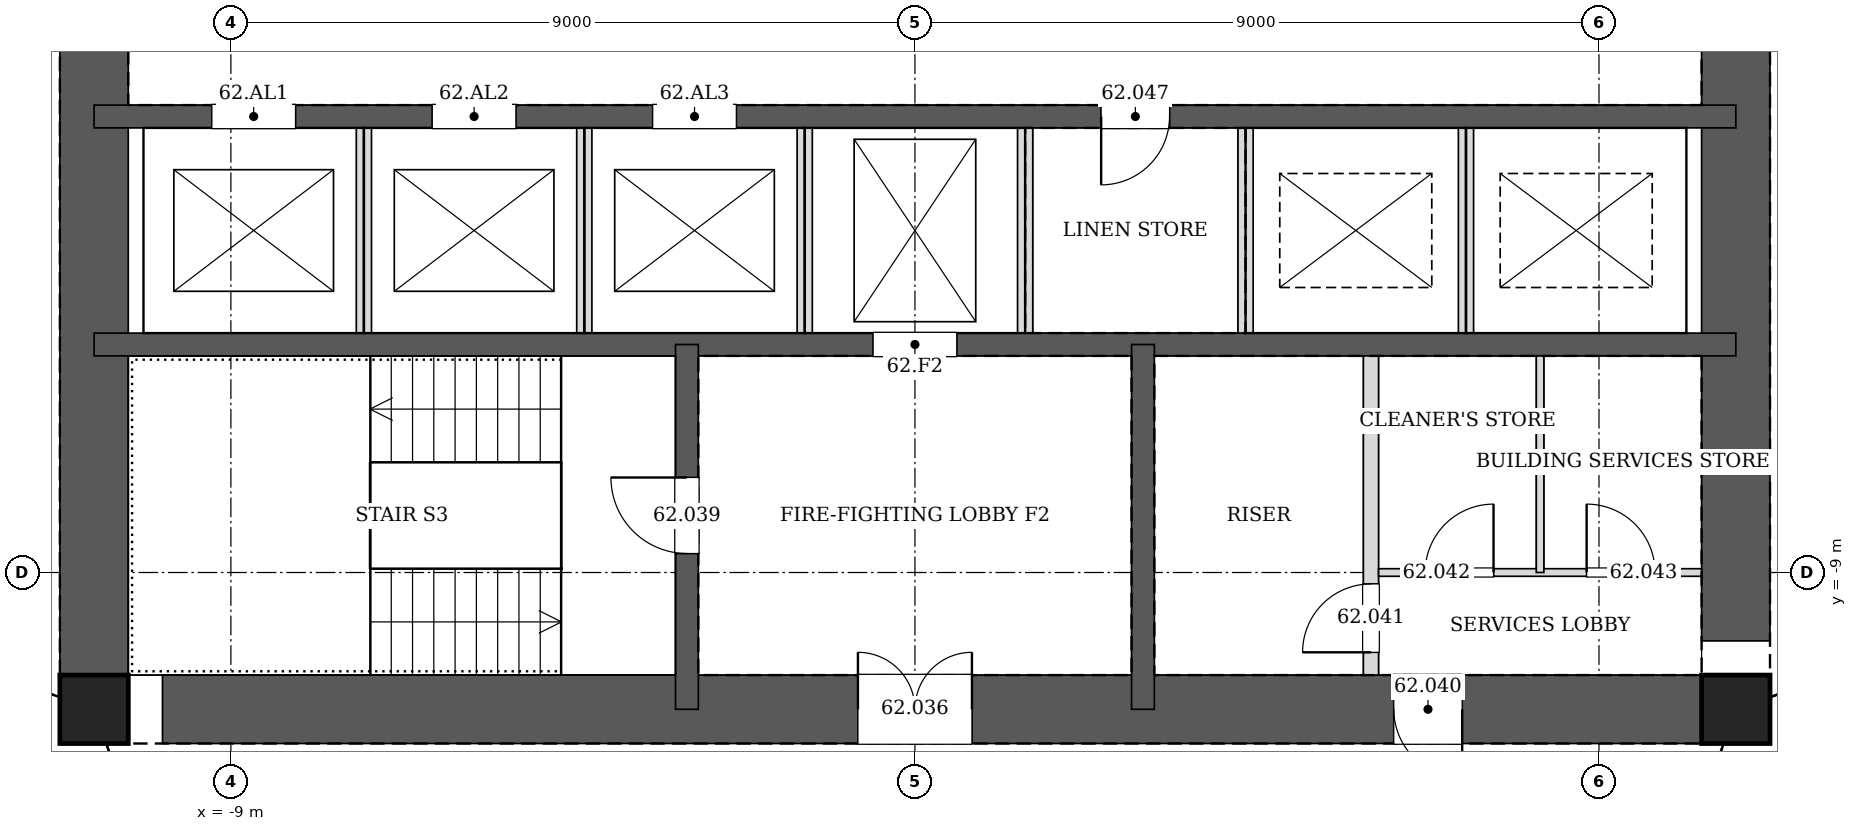
"""IFC4 building model, lengths in metres.
Left out: names, types, materials, properties, quantities, classifications, styles, units other than length and angle.
Written with IfcOpenShell. Run it as: python <this file> out.ifc"""

import sys

from ifc_helpers import new_model, si_unit, direction, frame, frame_2d, origin, origin_2d, place, context, subcontext, project, spatial, rectangle, hollow_rectangle, extrude, element, fill, save


model = new_model("IFC4")
c1 = context("Model", 3, precision=1e-05, world=origin(), true_north=direction((0.0, 1.0)))
c2 = subcontext(c1, "Body", "Model", "MODEL_VIEW")
j1 = project(units=[si_unit("LENGTHUNIT", "METRE"), si_unit("PLANEANGLEUNIT", "RADIAN")], contexts=[c1])
p1 = place(None, origin())
s1 = spatial("IfcSite", under=j1, at=p1, CompositionType="ELEMENT")
p2 = place(p1, origin())
s2 = spatial("IfcBuilding", under=s1, at=p2, CompositionType="ELEMENT")
p3 = place(p2, frame((0.0, 0.0, 258.4)))
s3 = spatial("IfcBuildingStorey", under=s2, at=p3, CompositionType="ELEMENT", Elevation=258.4)
for number, where, z_axis, x_axis in (
    (1, (-10.8, -10.8, 0.0), (0.0, 0.0, 1.0), (1.0, 0.0, 0.0)),
    (2, (10.8, -10.8, 0.0), (0.0, 0.0, 1.0), (1.0, 0.0, 0.0)),
):
    element("IfcColumn", number, at=place(p3, frame(where, z_axis=z_axis, x_axis=x_axis)), inside=s3, PredefinedType="COLUMN", context=c2, shape_type="SweptSolid", body=[
        extrude(hollow_rectangle(XDim=0.9, YDim=0.9, WallThickness=0.04, at=origin_2d()), origin(), (0.0, 0.0, 1.0), 3.4),
    ])
p4 = place(p3, frame((-10.8, -10.8, 0.0), z_axis=(0.0, 0.0, 1.0), x_axis=(1.0, 0.0, 0.0)))
e3 = element("IfcWall", 3, at=p4, inside=s3, PredefinedType="SOLIDWALL", context=c2, shape_type="SweptSolid", body=[
    extrude(rectangle(XDim=21.6, YDim=0.9, at=frame_2d((10.8, 0.0))), origin(), (0.0, 0.0, 1.0), 3.4),
])
p5 = place(p4, frame((10.05, 0.0, 0.0)))
e4 = element("IfcOpeningElement", 4, at=p5, cuts=e3, PredefinedType="OPENING", context=c2, shape_type="SweptSolid", body=[
    extrude(rectangle(XDim=1.5, YDim=2.1, at=frame_2d((0.75, 1.05))), frame((0.0, 0.46, 0.0), z_axis=(0.0, -1.0, 0.0), x_axis=(1.0, 0.0, 0.0)), (0.0, 0.0, 1.0), 0.92),
])
p6 = place(p4, frame((17.1, 0.0, 0.0)))
e5 = element("IfcOpeningElement", 5, at=p6, cuts=e3, PredefinedType="OPENING", context=c2, shape_type="SweptSolid", body=[
    extrude(rectangle(XDim=0.9, YDim=2.1, at=frame_2d((0.45, 1.05))), frame((0.0, 0.46, 0.0), z_axis=(0.0, -1.0, 0.0), x_axis=(1.0, 0.0, 0.0)), (0.0, 0.0, 1.0), 0.92),
])
p7 = place(p3, frame((10.8, -10.8, 0.0), z_axis=(0.0, 0.0, 1.0), x_axis=(0.0, 1.0, 0.0)))
e6 = element("IfcWall", 6, at=p7, inside=s3, PredefinedType="SOLIDWALL", context=c2, shape_type="SweptSolid", body=[
    extrude(rectangle(XDim=21.6, YDim=0.9, at=frame_2d((10.8, 0.0))), origin(), (0.0, 0.0, 1.0), 3.4),
])
p8 = place(p7, frame((11.7, 0.0, 0.0)))
e7 = element("IfcOpeningElement", 7, at=p8, cuts=e6, PredefinedType="OPENING", context=c2, shape_type="SweptSolid", body=[
    extrude(rectangle(XDim=1.2, YDim=2.1, at=frame_2d((0.6, 1.05))), frame((0.0, 0.46, 0.0), z_axis=(0.0, -1.0, 0.0), x_axis=(1.0, 0.0, 0.0)), (0.0, 0.0, 1.0), 0.92),
])
p9 = place(p7, frame((8.7, 0.0, 0.0)))
e8 = element("IfcOpeningElement", 8, at=p9, cuts=e6, PredefinedType="OPENING", context=c2, shape_type="SweptSolid", body=[
    extrude(rectangle(XDim=1.2, YDim=2.1, at=frame_2d((0.6, 1.05))), frame((0.0, 0.46, 0.0), z_axis=(0.0, -1.0, 0.0), x_axis=(1.0, 0.0, 0.0)), (0.0, 0.0, 1.0), 0.92),
])
p10 = place(p3, frame((-10.8, 10.8, 0.0), z_axis=(0.0, 0.0, 1.0), x_axis=(0.0, -1.0, 0.0)))
e9 = element("IfcWall", 9, at=p10, inside=s3, PredefinedType="SOLIDWALL", context=c2, shape_type="SweptSolid", body=[
    extrude(rectangle(XDim=21.6, YDim=0.9, at=frame_2d((10.8, 0.0))), origin(), (0.0, 0.0, 1.0), 3.4),
])
p11 = place(p10, frame((8.7, 0.0, 0.0)))
e10 = element("IfcOpeningElement", 10, at=p11, cuts=e9, PredefinedType="OPENING", context=c2, shape_type="SweptSolid", body=[
    extrude(rectangle(XDim=1.2, YDim=2.1, at=frame_2d((0.6, 1.05))), frame((0.0, 0.46, 0.0), z_axis=(0.0, -1.0, 0.0), x_axis=(1.0, 0.0, 0.0)), (0.0, 0.0, 1.0), 0.92),
])
p12 = place(p10, frame((11.7, 0.0, 0.0)))
e11 = element("IfcOpeningElement", 11, at=p12, cuts=e9, PredefinedType="OPENING", context=c2, shape_type="SweptSolid", body=[
    extrude(rectangle(XDim=1.2, YDim=2.1, at=frame_2d((0.6, 1.05))), frame((0.0, 0.46, 0.0), z_axis=(0.0, -1.0, 0.0), x_axis=(1.0, 0.0, 0.0)), (0.0, 0.0, 1.0), 0.92),
])
p13 = place(p3, frame((-10.8, -3.0, 0.0), z_axis=(0.0, 0.0, 1.0), x_axis=(1.0, 0.0, 0.0)))
e12 = element("IfcWall", 12, at=p13, inside=s3, PredefinedType="SOLIDWALL", context=c2, shape_type="SweptSolid", body=[
    extrude(rectangle(XDim=21.6, YDim=0.3, at=frame_2d((10.8, 0.0))), origin(), (0.0, 0.0, 1.0), 3.4),
])
p14 = place(p13, frame((13.25, 0.0, 0.0)))
e13 = element("IfcOpeningElement", 13, at=p14, cuts=e12, PredefinedType="OPENING", context=c2, shape_type="SweptSolid", body=[
    extrude(rectangle(XDim=0.9, YDim=2.1, at=frame_2d((0.45, 1.05))), frame((0.0, 0.16, 0.0), z_axis=(0.0, -1.0, 0.0), x_axis=(1.0, 0.0, 0.0)), (0.0, 0.0, 1.0), 0.32),
])
p15 = place(p13, frame((1.55, 0.0, 0.0)))
e14 = element("IfcOpeningElement", 14, at=p15, cuts=e12, PredefinedType="OPENING", context=c2, shape_type="SweptSolid", body=[
    extrude(rectangle(XDim=1.1, YDim=2.1, at=frame_2d((0.55, 1.05))), frame((0.0, 0.16, 0.0), z_axis=(0.0, -1.0, 0.0), x_axis=(1.0, 0.0, 0.0)), (0.0, 0.0, 1.0), 0.32),
])
p16 = place(p13, frame((4.45, 0.0, 0.0)))
e15 = element("IfcOpeningElement", 15, at=p16, cuts=e12, PredefinedType="OPENING", context=c2, shape_type="SweptSolid", body=[
    extrude(rectangle(XDim=1.1, YDim=2.1, at=frame_2d((0.55, 1.05))), frame((0.0, 0.16, 0.0), z_axis=(0.0, -1.0, 0.0), x_axis=(1.0, 0.0, 0.0)), (0.0, 0.0, 1.0), 0.32),
])
p17 = place(p13, frame((7.35, 0.0, 0.0)))
e16 = element("IfcOpeningElement", 16, at=p17, cuts=e12, PredefinedType="OPENING", context=c2, shape_type="SweptSolid", body=[
    extrude(rectangle(XDim=1.1, YDim=2.1, at=frame_2d((0.55, 1.05))), frame((0.0, 0.16, 0.0), z_axis=(0.0, -1.0, 0.0), x_axis=(1.0, 0.0, 0.0)), (0.0, 0.0, 1.0), 0.32),
])
p18 = place(p3, frame((-10.8, -6.0, 0.0), z_axis=(0.0, 0.0, 1.0), x_axis=(1.0, 0.0, 0.0)))
e17 = element("IfcWall", 17, at=p18, inside=s3, PredefinedType="SOLIDWALL", context=c2, shape_type="SweptSolid", body=[
    extrude(rectangle(XDim=21.6, YDim=0.3, at=frame_2d((10.8, 0.0))), origin(), (0.0, 0.0, 1.0), 3.4),
])
p19 = place(p18, frame((10.25, 0.0, 0.0)))
e18 = element("IfcOpeningElement", 18, at=p19, cuts=e17, PredefinedType="OPENING", context=c2, shape_type="SweptSolid", body=[
    extrude(rectangle(XDim=1.1, YDim=2.1, at=frame_2d((0.55, 1.05))), frame((0.0, 0.16, 0.0), z_axis=(0.0, -1.0, 0.0), x_axis=(1.0, 0.0, 0.0)), (0.0, 0.0, 1.0), 0.32),
])
p20 = place(p3, frame((-3.0, -6.0, 0.0), z_axis=(0.0, 0.0, 1.0), x_axis=(0.0, -1.0, 0.0)))
e19 = element("IfcWall", 19, at=p20, inside=s3, PredefinedType="SOLIDWALL", context=c2, shape_type="SweptSolid", body=[
    extrude(rectangle(XDim=4.8, YDim=0.3, at=frame_2d((2.4, 0.0))), origin(), (0.0, 0.0, 1.0), 3.4),
])
p21 = place(p20, frame((1.75, 0.0, 0.0)))
e20 = element("IfcOpeningElement", 20, at=p21, cuts=e19, PredefinedType="OPENING", context=c2, shape_type="SweptSolid", body=[
    extrude(rectangle(XDim=1.0, YDim=2.1, at=frame_2d((0.5, 1.05))), frame((0.0, 0.16, 0.0), z_axis=(0.0, -1.0, 0.0), x_axis=(1.0, 0.0, 0.0)), (0.0, 0.0, 1.0), 0.32),
])
p22 = place(p3, frame((3.0, -6.0, 0.0), z_axis=(0.0, 0.0, 1.0), x_axis=(0.0, -1.0, 0.0)))
e21 = element("IfcWall", 21, at=p22, inside=s3, PredefinedType="SOLIDWALL", context=c2, shape_type="SweptSolid", body=[
    extrude(rectangle(XDim=4.8, YDim=0.3, at=frame_2d((2.4, 0.0))), origin(), (0.0, 0.0, 1.0), 3.4),
])
for number, where, z_axis, x_axis in (
    (22, (-7.25, -5.85, 0.0), (0.0, 0.0, 1.0), (0.0, 1.0, 0.0)),
    (23, (-4.35, -5.85, 0.0), (0.0, 0.0, 1.0), (0.0, 1.0, 0.0)),
    (24, (-1.45, -5.85, 0.0), (0.0, 0.0, 1.0), (0.0, 1.0, 0.0)),
):
    element("IfcWall", number, at=place(p3, frame(where, z_axis=z_axis, x_axis=x_axis)), inside=s3, PredefinedType="PARTITIONING", context=c2, shape_type="SweptSolid", body=[
        extrude(rectangle(XDim=2.7, YDim=0.2, at=frame_2d((1.35, 0.0))), origin(), (0.0, 0.0, 1.0), 3.4),
    ])
for number, where, z_axis, x_axis in (
    (25, (1.45, -5.85, 0.0), (0.0, 0.0, 1.0), (0.0, 1.0, 0.0)),
    (26, (4.35, -5.85, 0.0), (0.0, 0.0, 1.0), (0.0, 1.0, 0.0)),
):
    element("IfcWall", number, at=place(p3, frame(where, z_axis=z_axis, x_axis=x_axis)), inside=s3, PredefinedType="PARTITIONING", context=c2, shape_type="SweptSolid", body=[
        extrude(rectangle(XDim=2.7, YDim=0.2, at=frame_2d((1.35, 0.0))), origin(), (0.0, 0.0, 1.0), 3.15),
    ])
p23 = place(p3, frame((7.25, -5.85, 0.0), z_axis=(0.0, 0.0, 1.0), x_axis=(0.0, 1.0, 0.0)))
e27 = element("IfcWall", 27, at=p23, inside=s3, PredefinedType="PARTITIONING", context=c2, shape_type="SweptSolid", body=[
    extrude(rectangle(XDim=2.7, YDim=0.2, at=frame_2d((1.35, 0.0))), origin(), (0.0, 0.0, 1.0), 3.4),
])
p24 = place(p3, frame((6.0, -10.35, 0.0), z_axis=(0.0, 0.0, 1.0), x_axis=(0.0, 1.0, 0.0)))
e28 = element("IfcWall", 28, at=p24, inside=s3, PredefinedType="PARTITIONING", context=c2, shape_type="SweptSolid", body=[
    extrude(rectangle(XDim=4.2, YDim=0.2, at=frame_2d((2.1, 0.0))), origin(), (0.0, 0.0, 1.0), 3.15),
])
p25 = place(p24, frame((0.3, 0.0, 0.0)))
e29 = element("IfcOpeningElement", 29, at=p25, cuts=e28, PredefinedType="OPENING", context=c2, shape_type="SweptSolid", body=[
    extrude(rectangle(XDim=0.9, YDim=2.1, at=frame_2d((0.45, 1.05))), frame((0.0, 0.11, 0.0), z_axis=(0.0, -1.0, 0.0), x_axis=(1.0, 0.0, 0.0)), (0.0, 0.0, 1.0), 0.22),
])
p26 = place(p3, frame((6.1, -9.0, 0.0), z_axis=(0.0, 0.0, 1.0), x_axis=(1.0, 0.0, 0.0)))
e30 = element("IfcWall", 30, at=p26, inside=s3, PredefinedType="PARTITIONING", context=c2, shape_type="SweptSolid", body=[
    extrude(rectangle(XDim=4.25, YDim=0.1, at=frame_2d((2.125, 0.0))), origin(), (0.0, 0.0, 1.0), 3.15),
])
p27 = place(p26, frame((0.613, 0.0, 0.0)))
e31 = element("IfcOpeningElement", 31, at=p27, cuts=e30, PredefinedType="OPENING", context=c2, shape_type="SweptSolid", body=[
    extrude(rectangle(XDim=0.9, YDim=2.1, at=frame_2d((0.45, 1.05))), frame((0.0, 0.06, 0.0), z_axis=(0.0, -1.0, 0.0), x_axis=(1.0, 0.0, 0.0)), (0.0, 0.0, 1.0), 0.12),
])
p28 = place(p26, frame((2.738, 0.0, 0.0)))
e32 = element("IfcOpeningElement", 32, at=p28, cuts=e30, PredefinedType="OPENING", context=c2, shape_type="SweptSolid", body=[
    extrude(rectangle(XDim=0.9, YDim=2.1, at=frame_2d((0.45, 1.05))), frame((0.0, 0.06, 0.0), z_axis=(0.0, -1.0, 0.0), x_axis=(1.0, 0.0, 0.0)), (0.0, 0.0, 1.0), 0.12),
])
p29 = place(p3, frame((8.225, -9.0, 0.0), z_axis=(0.0, 0.0, 1.0), x_axis=(0.0, 1.0, 0.0)))
e33 = element("IfcWall", 33, at=p29, inside=s3, PredefinedType="PARTITIONING", context=c2, shape_type="SweptSolid", body=[
    extrude(rectangle(XDim=2.85, YDim=0.1, at=frame_2d((1.425, 0.0))), origin(), (0.0, 0.0, 1.0), 3.15),
])
p30 = place(p5, origin())
e34 = element("IfcDoor", 34, at=p30, inside=s3, OperationType="DOUBLE_DOOR_SINGLE_SWING", PredefinedType="DOOR", context=c2, shape_type="SweptSolid", body=[
    extrude(rectangle(XDim=1.5, YDim=2.1, at=frame_2d((0.75, 1.05))), frame((0.0, 0.025, 0.0), z_axis=(0.0, -1.0, 0.0), x_axis=(1.0, 0.0, 0.0)), (0.0, 0.0, 1.0), 0.05),
])
fill(e4, e34)
p31 = place(p21, frame((1.0, 0.0, 0.0), z_axis=(0.0, 0.0, 1.0), x_axis=(-1.0, 0.0, 0.0)))
e35 = element("IfcDoor", 35, at=p31, inside=s3, OperationType="SINGLE_SWING_RIGHT", PredefinedType="DOOR", context=c2, shape_type="SweptSolid", body=[
    extrude(rectangle(XDim=1.0, YDim=2.1, at=frame_2d((0.5, 1.05))), frame((0.0, 0.025, 0.0), z_axis=(0.0, -1.0, 0.0), x_axis=(1.0, 0.0, 0.0)), (0.0, 0.0, 1.0), 0.05),
])
fill(e20, e35)
p32 = place(p6, frame((0.9, 0.0, 0.0), z_axis=(0.0, 0.0, 1.0), x_axis=(-1.0, 0.0, 0.0)))
e36 = element("IfcDoor", 36, at=p32, inside=s3, OperationType="SINGLE_SWING_LEFT", PredefinedType="DOOR", context=c2, shape_type="SweptSolid", body=[
    extrude(rectangle(XDim=0.9, YDim=2.1, at=frame_2d((0.45, 1.05))), frame((0.0, 0.025, 0.0), z_axis=(0.0, -1.0, 0.0), x_axis=(1.0, 0.0, 0.0)), (0.0, 0.0, 1.0), 0.05),
])
fill(e5, e36)
p33 = place(p25, origin())
e37 = element("IfcDoor", 37, at=p33, inside=s3, OperationType="SINGLE_SWING_LEFT", PredefinedType="DOOR", context=c2, shape_type="SweptSolid", body=[
    extrude(rectangle(XDim=0.9, YDim=2.1, at=frame_2d((0.45, 1.05))), frame((0.0, 0.025, 0.0), z_axis=(0.0, -1.0, 0.0), x_axis=(1.0, 0.0, 0.0)), (0.0, 0.0, 1.0), 0.05),
])
fill(e29, e37)
p34 = place(p27, origin())
e38 = element("IfcDoor", 38, at=p34, inside=s3, OperationType="SINGLE_SWING_RIGHT", PredefinedType="DOOR", context=c2, shape_type="SweptSolid", body=[
    extrude(rectangle(XDim=0.9, YDim=2.1, at=frame_2d((0.45, 1.05))), frame((0.0, 0.025, 0.0), z_axis=(0.0, -1.0, 0.0), x_axis=(1.0, 0.0, 0.0)), (0.0, 0.0, 1.0), 0.05),
])
fill(e31, e38)
p35 = place(p28, origin())
e39 = element("IfcDoor", 39, at=p35, inside=s3, OperationType="SINGLE_SWING_LEFT", PredefinedType="DOOR", context=c2, shape_type="SweptSolid", body=[
    extrude(rectangle(XDim=0.9, YDim=2.1, at=frame_2d((0.45, 1.05))), frame((0.0, 0.025, 0.0), z_axis=(0.0, -1.0, 0.0), x_axis=(1.0, 0.0, 0.0)), (0.0, 0.0, 1.0), 0.05),
])
fill(e32, e39)
p36 = place(p14, frame((0.9, 0.0, 0.0), z_axis=(0.0, 0.0, 1.0), x_axis=(-1.0, 0.0, 0.0)))
e40 = element("IfcDoor", 40, at=p36, inside=s3, OperationType="SINGLE_SWING_RIGHT", PredefinedType="DOOR", context=c2, shape_type="SweptSolid", body=[
    extrude(rectangle(XDim=0.9, YDim=2.1, at=frame_2d((0.45, 1.05))), frame((0.0, 0.025, 0.0), z_axis=(0.0, -1.0, 0.0), x_axis=(1.0, 0.0, 0.0)), (0.0, 0.0, 1.0), 0.05),
])
fill(e13, e40)
p37 = place(p19, origin())
e41 = element("IfcDoor", 41, at=p37, inside=s3, OperationType="DOUBLE_DOOR_SLIDING", PredefinedType="DOOR", context=c2, shape_type="SweptSolid", body=[
    extrude(rectangle(XDim=1.1, YDim=2.1, at=frame_2d((0.55, 1.05))), frame((0.0, 0.025, 0.0), z_axis=(0.0, -1.0, 0.0), x_axis=(1.0, 0.0, 0.0)), (0.0, 0.0, 1.0), 0.05),
])
fill(e18, e41)
p38 = place(p15, origin())
e42 = element("IfcDoor", 42, at=p38, inside=s3, OperationType="DOUBLE_DOOR_SLIDING", PredefinedType="DOOR", context=c2, shape_type="SweptSolid", body=[
    extrude(rectangle(XDim=1.1, YDim=2.1, at=frame_2d((0.55, 1.05))), frame((0.0, 0.025, 0.0), z_axis=(0.0, -1.0, 0.0), x_axis=(1.0, 0.0, 0.0)), (0.0, 0.0, 1.0), 0.05),
])
fill(e14, e42)
p39 = place(p16, origin())
e43 = element("IfcDoor", 43, at=p39, inside=s3, OperationType="DOUBLE_DOOR_SLIDING", PredefinedType="DOOR", context=c2, shape_type="SweptSolid", body=[
    extrude(rectangle(XDim=1.1, YDim=2.1, at=frame_2d((0.55, 1.05))), frame((0.0, 0.025, 0.0), z_axis=(0.0, -1.0, 0.0), x_axis=(1.0, 0.0, 0.0)), (0.0, 0.0, 1.0), 0.05),
])
fill(e15, e43)
p40 = place(p17, origin())
e44 = element("IfcDoor", 44, at=p40, inside=s3, OperationType="DOUBLE_DOOR_SLIDING", PredefinedType="DOOR", context=c2, shape_type="SweptSolid", body=[
    extrude(rectangle(XDim=1.1, YDim=2.1, at=frame_2d((0.55, 1.05))), frame((0.0, 0.025, 0.0), z_axis=(0.0, -1.0, 0.0), x_axis=(1.0, 0.0, 0.0)), (0.0, 0.0, 1.0), 0.05),
])
fill(e16, e44)
save(model, sys.argv[1])
